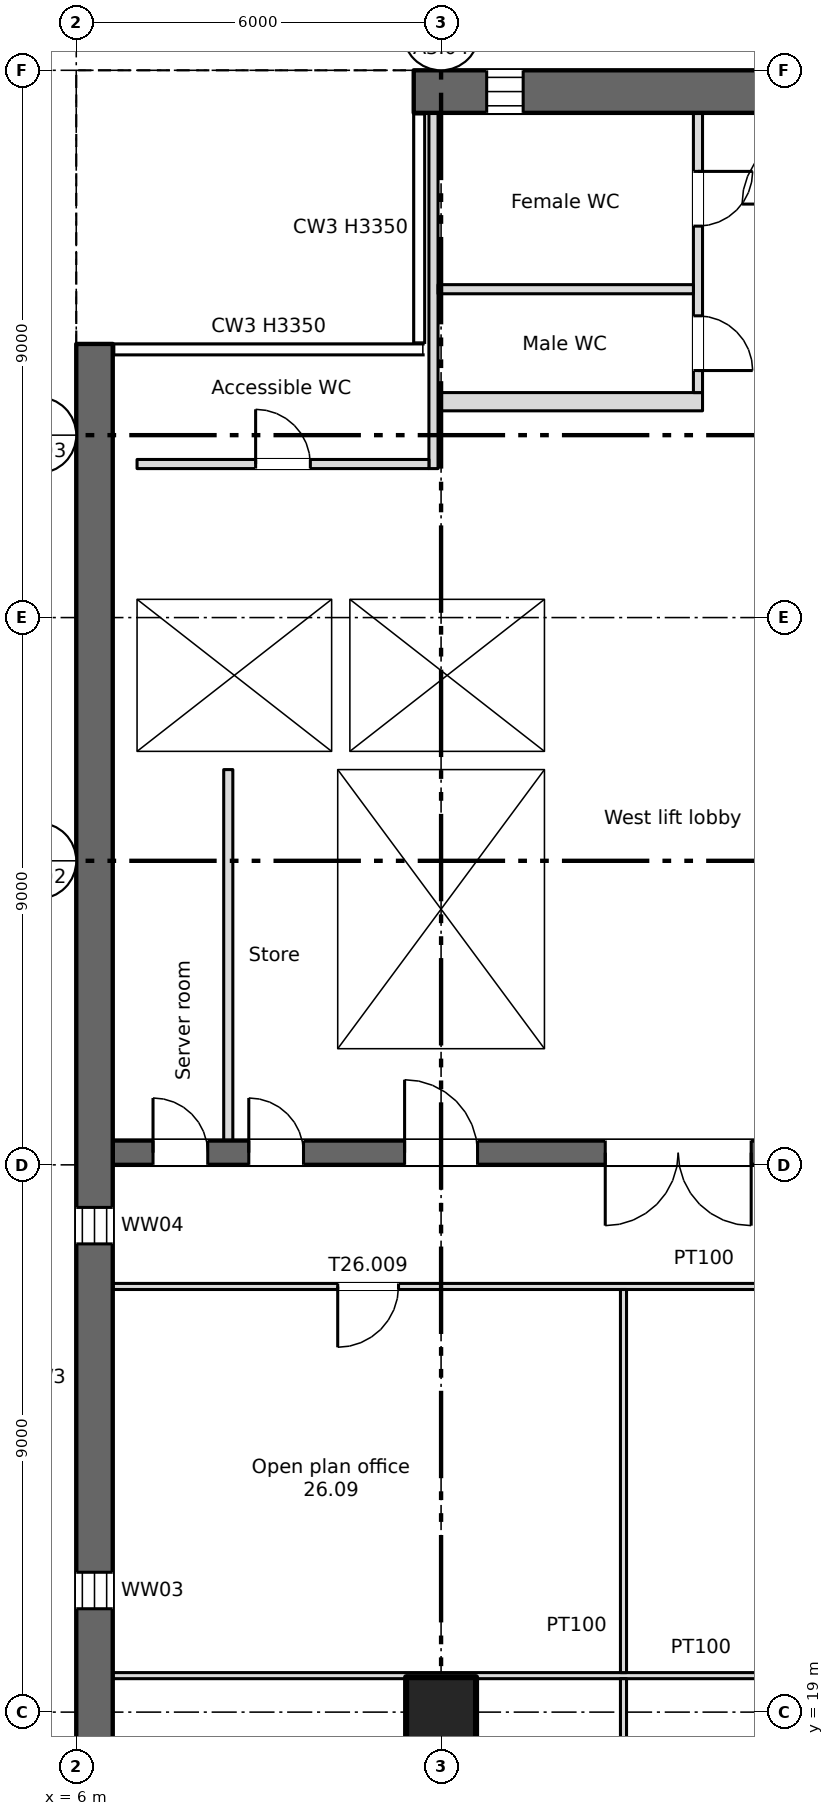
"""IFC4 building model, lengths in metres.
Left out: names, types, materials, properties, quantities, classifications, styles, units other than length and angle.
Written with IfcOpenShell. Run it as: python <this file> out.ifc"""

import sys

from ifc_helpers import new_model, si_unit, direction, frame, frame_2d, origin, origin_2d, place, context, subcontext, project, spatial, rectangle, extrude, element, fill, save


model = new_model("IFC4")
c1 = context("Model", 3, precision=1e-05, world=origin(), true_north=direction((0.0, 1.0)))
c2 = subcontext(c1, "Body", "Model", "MODEL_VIEW")
j1 = project(units=[si_unit("LENGTHUNIT", "METRE"), si_unit("PLANEANGLEUNIT", "RADIAN")], contexts=[c1])
p1 = place(None, origin())
s1 = spatial("IfcSite", under=j1, at=p1, CompositionType="ELEMENT")
p2 = place(p1, origin())
s2 = spatial("IfcBuilding", under=s1, at=p2, CompositionType="ELEMENT")
p3 = place(p2, frame((0.0, 0.0, 181.75)))
s3 = spatial("IfcBuildingStorey", under=s2, at=p3, CompositionType="ELEMENT", Elevation=181.75)
p4 = place(p3, frame((12.0, 19.0, 0.0), z_axis=(0.0, 0.0, 1.0), x_axis=(1.0, 0.0, 0.0)))
e1 = element("IfcColumn", 1, at=p4, inside=s3, PredefinedType="COLUMN", context=c2, shape_type="SweptSolid", body=[
    extrude(rectangle(XDim=1.15, YDim=1.15, at=origin_2d()), origin(), (0.0, 0.0, 1.0), 3.35),
])
p5 = place(p3, frame((6.3, 7.5, 0.0), z_axis=(0.0, 0.0, 1.0), x_axis=(0.0, 1.0, 0.0)))
e2 = element("IfcWall", 2, at=p5, inside=s3, PredefinedType="SHEAR", context=c2, shape_type="SweptSolid", body=[
    extrude(rectangle(XDim=34.0, YDim=0.6, at=frame_2d((17.0, 0.0))), origin(), (0.0, 0.0, 1.0), 3.35),
])
p6 = place(p5, frame((1.2, 0.0, 0.6)))
e3 = element("IfcOpeningElement", 3, at=p6, cuts=e2, PredefinedType="OPENING", context=c2, shape_type="SweptSolid", body=[
    extrude(rectangle(XDim=0.6, YDim=2.4, at=frame_2d((0.3, 1.2))), frame((0.0, 0.31, 0.0), z_axis=(0.0, -1.0, 0.0), x_axis=(1.0, 0.0, 0.0)), (0.0, 0.0, 1.0), 0.62),
])
p7 = place(p5, frame((7.2, 0.0, 0.6)))
e4 = element("IfcOpeningElement", 4, at=p7, cuts=e2, PredefinedType="OPENING", context=c2, shape_type="SweptSolid", body=[
    extrude(rectangle(XDim=0.6, YDim=2.4, at=frame_2d((0.3, 1.2))), frame((0.0, 0.31, 0.0), z_axis=(0.0, -1.0, 0.0), x_axis=(1.0, 0.0, 0.0)), (0.0, 0.0, 1.0), 0.62),
])
p8 = place(p5, frame((13.2, 0.0, 0.6)))
e5 = element("IfcOpeningElement", 5, at=p8, cuts=e2, PredefinedType="OPENING", context=c2, shape_type="SweptSolid", body=[
    extrude(rectangle(XDim=0.6, YDim=2.4, at=frame_2d((0.3, 1.2))), frame((0.0, 0.31, 0.0), z_axis=(0.0, -1.0, 0.0), x_axis=(1.0, 0.0, 0.0)), (0.0, 0.0, 1.0), 0.62),
])
p9 = place(p5, frame((19.2, 0.0, 0.6)))
e6 = element("IfcOpeningElement", 6, at=p9, cuts=e2, PredefinedType="OPENING", context=c2, shape_type="SweptSolid", body=[
    extrude(rectangle(XDim=0.6, YDim=2.4, at=frame_2d((0.3, 1.2))), frame((0.0, 0.31, 0.0), z_axis=(0.0, -1.0, 0.0), x_axis=(1.0, 0.0, 0.0)), (0.0, 0.0, 1.0), 0.62),
])
p10 = place(p3, frame((11.55, 45.65, 0.0), z_axis=(0.0, 0.0, 1.0), x_axis=(1.0, 0.0, 0.0)))
e7 = element("IfcWall", 7, at=p10, inside=s3, PredefinedType="SHEAR", context=c2, shape_type="SweptSolid", body=[
    extrude(rectangle(XDim=54.9, YDim=0.7, at=frame_2d((27.45, 0.0))), origin(), (0.0, 0.0, 1.0), 3.35),
])
p11 = place(p10, frame((1.2, 0.0, 0.6)))
e8 = element("IfcOpeningElement", 8, at=p11, cuts=e7, PredefinedType="OPENING", context=c2, shape_type="SweptSolid", body=[
    extrude(rectangle(XDim=0.6, YDim=2.4, at=frame_2d((0.3, 1.2))), frame((0.0, 0.36, 0.0), z_axis=(0.0, -1.0, 0.0), x_axis=(1.0, 0.0, 0.0)), (0.0, 0.0, 1.0), 0.72),
])
p12 = place(p10, frame((49.2, 0.0, 0.6)))
e9 = element("IfcOpeningElement", 9, at=p12, cuts=e7, PredefinedType="OPENING", context=c2, shape_type="SweptSolid", body=[
    extrude(rectangle(XDim=0.6, YDim=2.4, at=frame_2d((0.3, 1.2))), frame((0.0, 0.36, 0.0), z_axis=(0.0, -1.0, 0.0), x_axis=(1.0, 0.0, 0.0)), (0.0, 0.0, 1.0), 0.72),
])
p13 = place(p3, frame((6.6, 28.2, 0.0), z_axis=(0.0, 0.0, 1.0), x_axis=(1.0, 0.0, 0.0)))
e10 = element("IfcWall", 10, at=p13, inside=s3, PredefinedType="SHEAR", context=c2, shape_type="SweptSolid", body=[
    extrude(rectangle(XDim=57.9, YDim=0.4, at=frame_2d((28.95, 0.0))), origin(), (0.0, 0.0, 1.0), 3.35),
])
p14 = place(p13, frame((12.913, 0.0, 0.0)))
e11 = element("IfcOpeningElement", 11, at=p14, cuts=e10, PredefinedType="OPENING", context=c2, shape_type="SweptSolid", body=[
    extrude(rectangle(XDim=0.9, YDim=2.1, at=frame_2d((0.45, 1.05))), frame((0.0, 0.21, 0.0), z_axis=(0.0, -1.0, 0.0), x_axis=(1.0, 0.0, 0.0)), (0.0, 0.0, 1.0), 0.42),
])
p15 = place(p13, frame((15.488, 0.0, 0.0)))
e12 = element("IfcOpeningElement", 12, at=p15, cuts=e10, PredefinedType="OPENING", context=c2, shape_type="SweptSolid", body=[
    extrude(rectangle(XDim=0.9, YDim=2.1, at=frame_2d((0.45, 1.05))), frame((0.0, 0.21, 0.0), z_axis=(0.0, -1.0, 0.0), x_axis=(1.0, 0.0, 0.0)), (0.0, 0.0, 1.0), 0.42),
])
p16 = place(p13, frame((48.413, 0.0, 0.0)))
e13 = element("IfcOpeningElement", 13, at=p16, cuts=e10, PredefinedType="OPENING", context=c2, shape_type="SweptSolid", body=[
    extrude(rectangle(XDim=0.9, YDim=2.1, at=frame_2d((0.45, 1.05))), frame((0.0, 0.21, 0.0), z_axis=(0.0, -1.0, 0.0), x_axis=(1.0, 0.0, 0.0)), (0.0, 0.0, 1.0), 0.42),
])
p17 = place(p13, frame((50.988, 0.0, 0.0)))
e14 = element("IfcOpeningElement", 14, at=p17, cuts=e10, PredefinedType="OPENING", context=c2, shape_type="SweptSolid", body=[
    extrude(rectangle(XDim=0.9, YDim=2.1, at=frame_2d((0.45, 1.05))), frame((0.0, 0.21, 0.0), z_axis=(0.0, -1.0, 0.0), x_axis=(1.0, 0.0, 0.0)), (0.0, 0.0, 1.0), 0.42),
])
p18 = place(p13, frame((0.663, 0.0, 0.0)))
e15 = element("IfcOpeningElement", 15, at=p18, cuts=e10, PredefinedType="OPENING", context=c2, shape_type="SweptSolid", body=[
    extrude(rectangle(XDim=0.9, YDim=2.1, at=frame_2d((0.45, 1.05))), frame((0.0, 0.21, 0.0), z_axis=(0.0, -1.0, 0.0), x_axis=(1.0, 0.0, 0.0)), (0.0, 0.0, 1.0), 0.42),
])
p19 = place(p13, frame((2.238, 0.0, 0.0)))
e16 = element("IfcOpeningElement", 16, at=p19, cuts=e10, PredefinedType="OPENING", context=c2, shape_type="SweptSolid", body=[
    extrude(rectangle(XDim=0.9, YDim=2.1, at=frame_2d((0.45, 1.05))), frame((0.0, 0.21, 0.0), z_axis=(0.0, -1.0, 0.0), x_axis=(1.0, 0.0, 0.0)), (0.0, 0.0, 1.0), 0.42),
])
p20 = place(p13, frame((4.8, 0.0, 0.0)))
e17 = element("IfcOpeningElement", 17, at=p20, cuts=e10, PredefinedType="OPENING", context=c2, shape_type="SweptSolid", body=[
    extrude(rectangle(XDim=1.2, YDim=2.1, at=frame_2d((0.6, 1.05))), frame((0.0, 0.21, 0.0), z_axis=(0.0, -1.0, 0.0), x_axis=(1.0, 0.0, 0.0)), (0.0, 0.0, 1.0), 0.42),
])
p21 = place(p13, frame((31.8, 0.0, 0.0)))
e18 = element("IfcOpeningElement", 18, at=p21, cuts=e10, PredefinedType="OPENING", context=c2, shape_type="SweptSolid", body=[
    extrude(rectangle(XDim=1.2, YDim=2.1, at=frame_2d((0.6, 1.05))), frame((0.0, 0.21, 0.0), z_axis=(0.0, -1.0, 0.0), x_axis=(1.0, 0.0, 0.0)), (0.0, 0.0, 1.0), 0.42),
])
p22 = place(p13, frame((55.3, 0.0, 0.0)))
e19 = element("IfcOpeningElement", 19, at=p22, cuts=e10, PredefinedType="OPENING", context=c2, shape_type="SweptSolid", body=[
    extrude(rectangle(XDim=1.2, YDim=2.1, at=frame_2d((0.6, 1.05))), frame((0.0, 0.21, 0.0), z_axis=(0.0, -1.0, 0.0), x_axis=(1.0, 0.0, 0.0)), (0.0, 0.0, 1.0), 0.42),
])
p23 = place(p13, frame((21.8, 0.0, 0.0)))
e20 = element("IfcOpeningElement", 20, at=p23, cuts=e10, PredefinedType="OPENING", context=c2, shape_type="SweptSolid", body=[
    extrude(rectangle(XDim=1.2, YDim=2.1, at=frame_2d((0.6, 1.05))), frame((0.0, 0.21, 0.0), z_axis=(0.0, -1.0, 0.0), x_axis=(1.0, 0.0, 0.0)), (0.0, 0.0, 1.0), 0.42),
])
p24 = place(p13, frame((41.8, 0.0, 0.0)))
e21 = element("IfcOpeningElement", 21, at=p24, cuts=e10, PredefinedType="OPENING", context=c2, shape_type="SweptSolid", body=[
    extrude(rectangle(XDim=1.2, YDim=2.1, at=frame_2d((0.6, 1.05))), frame((0.0, 0.21, 0.0), z_axis=(0.0, -1.0, 0.0), x_axis=(1.0, 0.0, 0.0)), (0.0, 0.0, 1.0), 0.42),
])
p25 = place(p13, frame((24.95, 0.0, 0.0)))
e22 = element("IfcOpeningElement", 22, at=p25, cuts=e10, PredefinedType="OPENING", context=c2, shape_type="SweptSolid", body=[
    extrude(rectangle(XDim=2.4, YDim=2.1, at=frame_2d((1.2, 1.05))), frame((0.0, 0.21, 0.0), z_axis=(0.0, -1.0, 0.0), x_axis=(1.0, 0.0, 0.0)), (0.0, 0.0, 1.0), 0.42),
])
p26 = place(p13, frame((37.45, 0.0, 0.0)))
e23 = element("IfcOpeningElement", 23, at=p26, cuts=e10, PredefinedType="OPENING", context=c2, shape_type="SweptSolid", body=[
    extrude(rectangle(XDim=2.4, YDim=2.1, at=frame_2d((1.2, 1.05))), frame((0.0, 0.21, 0.0), z_axis=(0.0, -1.0, 0.0), x_axis=(1.0, 0.0, 0.0)), (0.0, 0.0, 1.0), 0.42),
])
p27 = place(p13, frame((8.1, 0.0, 0.0)))
e24 = element("IfcOpeningElement", 24, at=p27, cuts=e10, PredefinedType="OPENING", context=c2, shape_type="SweptSolid", body=[
    extrude(rectangle(XDim=2.4, YDim=2.1, at=frame_2d((1.2, 1.05))), frame((0.0, 0.21, 0.0), z_axis=(0.0, -1.0, 0.0), x_axis=(1.0, 0.0, 0.0)), (0.0, 0.0, 1.0), 0.42),
])
p28 = place(p13, frame((28.95, 0.0, 0.0)))
e25 = element("IfcOpeningElement", 25, at=p28, cuts=e10, PredefinedType="OPENING", context=c2, shape_type="SweptSolid", body=[
    extrude(rectangle(XDim=0.9, YDim=2.1, at=frame_2d((0.45, 1.05))), frame((0.0, 0.21, 0.0), z_axis=(0.0, -1.0, 0.0), x_axis=(1.0, 0.0, 0.0)), (0.0, 0.0, 1.0), 0.42),
])
p29 = place(p13, frame((34.95, 0.0, 0.0)))
e26 = element("IfcOpeningElement", 26, at=p29, cuts=e10, PredefinedType="OPENING", context=c2, shape_type="SweptSolid", body=[
    extrude(rectangle(XDim=0.9, YDim=2.1, at=frame_2d((0.45, 1.05))), frame((0.0, 0.21, 0.0), z_axis=(0.0, -1.0, 0.0), x_axis=(1.0, 0.0, 0.0)), (0.0, 0.0, 1.0), 0.42),
])
p30 = place(p3, frame((6.8, 28.4, 0.0), z_axis=(0.0, 0.0, 1.0), x_axis=(0.0, 1.0, 0.0)))
e27 = element("IfcWall", 27, at=p30, inside=s3, PredefinedType="SHEAR", context=c2, shape_type="SweptSolid", body=[
    extrude(rectangle(XDim=12.85, YDim=0.4, at=frame_2d((6.425, 0.0))), origin(), (0.0, 0.0, 1.0), 3.35),
])
for number, where, z_axis, x_axis in (
    (28, (10.15, 28.4, 0.0), (0.0, 0.0, 1.0), (0.0, 1.0, 0.0)),
    (29, (13.85, 28.4, 0.0), (0.0, 0.0, 1.0), (0.0, 1.0, 0.0)),
):
    element("IfcWall", number, at=place(p3, frame(where, z_axis=z_axis, x_axis=x_axis)), inside=s3, PredefinedType="SHEAR", context=c2, shape_type="SweptSolid", body=[
        extrude(rectangle(XDim=6.1, YDim=0.3, at=frame_2d((3.05, 0.0))), origin(), (0.0, 0.0, 1.0), 3.35),
    ])
for number, where, z_axis, x_axis in (
    (30, (7.0, 34.65, 0.0), (0.0, 0.0, 1.0), (1.0, 0.0, 0.0)),
    (31, (7.0, 37.45, 0.0), (0.0, 0.0, 1.0), (1.0, 0.0, 0.0)),
):
    element("IfcWall", number, at=place(p3, frame(where, z_axis=z_axis, x_axis=x_axis)), inside=s3, PredefinedType="SHEAR", context=c2, shape_type="SweptSolid", body=[
        extrude(rectangle(XDim=7.0, YDim=0.3, at=frame_2d((3.5, 0.0))), origin(), (0.0, 0.0, 1.0), 3.35),
    ])
p31 = place(p3, frame((13.85, 34.8, 0.0), z_axis=(0.0, 0.0, 1.0), x_axis=(0.0, 1.0, 0.0)))
e32 = element("IfcWall", 32, at=p31, inside=s3, PredefinedType="SHEAR", context=c2, shape_type="SweptSolid", body=[
    extrude(rectangle(XDim=2.5, YDim=0.3, at=frame_2d((1.25, 0.0))), origin(), (0.0, 0.0, 1.0), 3.35),
])
p32 = place(p3, frame((11.95, 40.55, 0.0), z_axis=(0.0, 0.0, 1.0), x_axis=(1.0, 0.0, 0.0)))
e33 = element("IfcWall", 33, at=p32, inside=s3, PredefinedType="PARTITIONING", context=c2, shape_type="SweptSolid", body=[
    extrude(rectangle(XDim=4.35, YDim=0.3, at=frame_2d((2.175, 0.0))), origin(), (0.0, 0.0, 1.0), 3.35),
])
p33 = place(p3, frame((10.35, 34.8, 0.0), z_axis=(0.0, 0.0, 1.0), x_axis=(0.0, 1.0, 0.0)))
e34 = element("IfcWall", 34, at=p33, inside=s3, PredefinedType="SHEAR", context=c2, shape_type="SweptSolid", body=[
    extrude(rectangle(XDim=2.5, YDim=0.3, at=frame_2d((1.25, 0.0))), origin(), (0.0, 0.0, 1.0), 3.35),
])
p34 = place(p3, frame((16.225, 45.3, 0.0), z_axis=(0.0, 0.0, 1.0), x_axis=(0.0, -1.0, 0.0)))
e35 = element("IfcWall", 35, at=p34, inside=s3, PredefinedType="PARTITIONING", context=c2, shape_type="SweptSolid", body=[
    extrude(rectangle(XDim=4.6, YDim=0.15, at=frame_2d((2.3, 0.0))), origin(), (0.0, 0.0, 1.0), 3.35),
])
p35 = place(p34, frame((3.337, 0.0, 0.0)))
e36 = element("IfcOpeningElement", 36, at=p35, cuts=e35, PredefinedType="OPENING", context=c2, shape_type="SweptSolid", body=[
    extrude(rectangle(XDim=0.9, YDim=2.1, at=frame_2d((0.45, 1.05))), frame((0.0, 0.085, 0.0), z_axis=(0.0, -1.0, 0.0), x_axis=(1.0, 0.0, 0.0)), (0.0, 0.0, 1.0), 0.17),
])
p36 = place(p34, frame((0.962, 0.0, 0.0)))
e37 = element("IfcOpeningElement", 37, at=p36, cuts=e35, PredefinedType="OPENING", context=c2, shape_type="SweptSolid", body=[
    extrude(rectangle(XDim=0.9, YDim=2.1, at=frame_2d((0.45, 1.05))), frame((0.0, 0.085, 0.0), z_axis=(0.0, -1.0, 0.0), x_axis=(1.0, 0.0, 0.0)), (0.0, 0.0, 1.0), 0.17),
])
p37 = place(p3, frame((8.5, 28.4, 0.0), z_axis=(0.0, 0.0, 1.0), x_axis=(0.0, 1.0, 0.0)))
e38 = element("IfcWall", 38, at=p37, inside=s3, PredefinedType="PARTITIONING", context=c2, shape_type="SweptSolid", body=[
    extrude(rectangle(XDim=6.1, YDim=0.15, at=frame_2d((3.05, 0.0))), origin(), (0.0, 0.0, 1.0), 3.35),
])
p38 = place(p3, frame((11.875, 39.45, 0.0), z_axis=(0.0, 0.0, 1.0), x_axis=(0.0, 1.0, 0.0)))
e39 = element("IfcWall", 39, at=p38, inside=s3, PredefinedType="PARTITIONING", context=c2, shape_type="SweptSolid", body=[
    extrude(rectangle(XDim=5.85, YDim=0.15, at=frame_2d((2.925, 0.0))), origin(), (0.0, 0.0, 1.0), 3.35),
])
p39 = place(p3, frame((7.0, 39.525, 0.0), z_axis=(0.0, 0.0, 1.0), x_axis=(1.0, 0.0, 0.0)))
e40 = element("IfcWall", 40, at=p39, inside=s3, PredefinedType="PARTITIONING", context=c2, shape_type="SweptSolid", body=[
    extrude(rectangle(XDim=4.8, YDim=0.15, at=frame_2d((2.4, 0.0))), origin(), (0.0, 0.0, 1.0), 3.35),
])
p40 = place(p39, frame((1.95, 0.0, 0.0)))
e41 = element("IfcOpeningElement", 41, at=p40, cuts=e40, PredefinedType="OPENING", context=c2, shape_type="SweptSolid", body=[
    extrude(rectangle(XDim=0.9, YDim=2.1, at=frame_2d((0.45, 1.05))), frame((0.0, 0.085, 0.0), z_axis=(0.0, -1.0, 0.0), x_axis=(1.0, 0.0, 0.0)), (0.0, 0.0, 1.0), 0.17),
])
p41 = place(p3, frame((11.95, 42.4, 0.0), z_axis=(0.0, 0.0, 1.0), x_axis=(1.0, 0.0, 0.0)))
e42 = element("IfcWall", 42, at=p41, inside=s3, PredefinedType="PARTITIONING", context=c2, shape_type="SweptSolid", body=[
    extrude(rectangle(XDim=4.2, YDim=0.15, at=frame_2d((2.1, 0.0))), origin(), (0.0, 0.0, 1.0), 3.35),
])
p42 = place(p3, frame((6.6, 19.6, 0.0), z_axis=(0.0, 0.0, 1.0), x_axis=(1.0, 0.0, 0.0)))
e43 = element("IfcWall", 43, at=p42, inside=s3, PredefinedType="PARTITIONING", context=c2, shape_type="SweptSolid", body=[
    extrude(rectangle(XDim=19.35, YDim=0.1, at=frame_2d((9.675, 0.0))), origin(), (0.0, 0.0, 1.0), 3.35),
])
p43 = place(p3, frame((6.6, 26.0, 0.0), z_axis=(0.0, 0.0, 1.0), x_axis=(1.0, 0.0, 0.0)))
e44 = element("IfcWall", 44, at=p43, inside=s3, PredefinedType="PARTITIONING", context=c2, shape_type="SweptSolid", body=[
    extrude(rectangle(XDim=19.45, YDim=0.1, at=frame_2d((9.725, 0.0))), origin(), (0.0, 0.0, 1.0), 3.35),
])
p44 = place(p43, frame((3.7, 0.0, 0.0)))
e45 = element("IfcOpeningElement", 45, at=p44, cuts=e44, PredefinedType="OPENING", context=c2, shape_type="SweptSolid", body=[
    extrude(rectangle(XDim=1.0, YDim=2.1, at=frame_2d((0.5, 1.05))), frame((0.0, 0.06, 0.0), z_axis=(0.0, -1.0, 0.0), x_axis=(1.0, 0.0, 0.0)), (0.0, 0.0, 1.0), 0.12),
])
p45 = place(p43, frame((13.0, 0.0, 0.0)))
e46 = element("IfcOpeningElement", 46, at=p45, cuts=e44, PredefinedType="OPENING", context=c2, shape_type="SweptSolid", body=[
    extrude(rectangle(XDim=1.8, YDim=2.1, at=frame_2d((0.9, 1.05))), frame((0.0, 0.06, 0.0), z_axis=(0.0, -1.0, 0.0), x_axis=(1.0, 0.0, 0.0)), (0.0, 0.0, 1.0), 0.12),
])
p46 = place(p3, frame((15.0, 12.65, 0.0), z_axis=(0.0, 0.0, 1.0), x_axis=(0.0, 1.0, 0.0)))
e47 = element("IfcWall", 47, at=p46, inside=s3, PredefinedType="PARTITIONING", context=c2, shape_type="SweptSolid", body=[
    extrude(rectangle(XDim=6.9, YDim=0.1, at=frame_2d((3.45, 0.0))), origin(), (0.0, 0.0, 1.0), 3.35),
])
p47 = place(p3, frame((15.0, 19.65, 0.0), z_axis=(0.0, 0.0, 1.0), x_axis=(0.0, 1.0, 0.0)))
e48 = element("IfcWall", 48, at=p47, inside=s3, PredefinedType="PARTITIONING", context=c2, shape_type="SweptSolid", body=[
    extrude(rectangle(XDim=6.3, YDim=0.1, at=frame_2d((3.15, 0.0))), origin(), (0.0, 0.0, 1.0), 3.35),
])
p48 = place(p11, origin())
e49 = element("IfcWindow", 49, at=p48, inside=s3, PartitioningType="SINGLE_PANEL", PredefinedType="WINDOW", context=c2, shape_type="SweptSolid", body=[
    extrude(rectangle(XDim=0.6, YDim=2.4, at=frame_2d((0.3, 1.2))), frame((0.0, 0.03, 0.0), z_axis=(0.0, -1.0, 0.0), x_axis=(1.0, 0.0, 0.0)), (0.0, 0.0, 1.0), 0.06),
])
fill(e8, e49)
p49 = place(p8, origin())
e50 = element("IfcWindow", 50, at=p49, inside=s3, PartitioningType="SINGLE_PANEL", PredefinedType="WINDOW", context=c2, shape_type="SweptSolid", body=[
    extrude(rectangle(XDim=0.6, YDim=2.4, at=frame_2d((0.3, 1.2))), frame((0.0, 0.03, 0.0), z_axis=(0.0, -1.0, 0.0), x_axis=(1.0, 0.0, 0.0)), (0.0, 0.0, 1.0), 0.06),
])
fill(e5, e50)
p50 = place(p9, origin())
e51 = element("IfcWindow", 51, at=p50, inside=s3, PartitioningType="SINGLE_PANEL", PredefinedType="WINDOW", context=c2, shape_type="SweptSolid", body=[
    extrude(rectangle(XDim=0.6, YDim=2.4, at=frame_2d((0.3, 1.2))), frame((0.0, 0.03, 0.0), z_axis=(0.0, -1.0, 0.0), x_axis=(1.0, 0.0, 0.0)), (0.0, 0.0, 1.0), 0.06),
])
fill(e6, e51)
p51 = place(p18, origin())
e52 = element("IfcDoor", 52, at=p51, inside=s3, OperationType="SINGLE_SWING_LEFT", PredefinedType="DOOR", context=c2, shape_type="SweptSolid", body=[
    extrude(rectangle(XDim=0.9, YDim=2.1, at=frame_2d((0.45, 1.05))), frame((0.0, 0.025, 0.0), z_axis=(0.0, -1.0, 0.0), x_axis=(1.0, 0.0, 0.0)), (0.0, 0.0, 1.0), 0.05),
])
fill(e15, e52)
p52 = place(p19, origin())
e53 = element("IfcDoor", 53, at=p52, inside=s3, OperationType="SINGLE_SWING_LEFT", PredefinedType="DOOR", context=c2, shape_type="SweptSolid", body=[
    extrude(rectangle(XDim=0.9, YDim=2.1, at=frame_2d((0.45, 1.05))), frame((0.0, 0.025, 0.0), z_axis=(0.0, -1.0, 0.0), x_axis=(1.0, 0.0, 0.0)), (0.0, 0.0, 1.0), 0.05),
])
fill(e16, e53)
p53 = place(p40, origin())
e54 = element("IfcDoor", 54, at=p53, inside=s3, OperationType="SINGLE_SWING_LEFT", PredefinedType="DOOR", context=c2, shape_type="SweptSolid", body=[
    extrude(rectangle(XDim=0.9, YDim=2.1, at=frame_2d((0.45, 1.05))), frame((0.0, 0.025, 0.0), z_axis=(0.0, -1.0, 0.0), x_axis=(1.0, 0.0, 0.0)), (0.0, 0.0, 1.0), 0.05),
])
fill(e41, e54)
p54 = place(p35, origin())
e55 = element("IfcDoor", 55, at=p54, inside=s3, OperationType="SINGLE_SWING_RIGHT", PredefinedType="DOOR", context=c2, shape_type="SweptSolid", body=[
    extrude(rectangle(XDim=0.9, YDim=2.1, at=frame_2d((0.45, 1.05))), frame((0.0, 0.025, 0.0), z_axis=(0.0, -1.0, 0.0), x_axis=(1.0, 0.0, 0.0)), (0.0, 0.0, 1.0), 0.05),
])
fill(e36, e55)
p55 = place(p36, origin())
e56 = element("IfcDoor", 56, at=p55, inside=s3, OperationType="SINGLE_SWING_LEFT", PredefinedType="DOOR", context=c2, shape_type="SweptSolid", body=[
    extrude(rectangle(XDim=0.9, YDim=2.1, at=frame_2d((0.45, 1.05))), frame((0.0, 0.025, 0.0), z_axis=(0.0, -1.0, 0.0), x_axis=(1.0, 0.0, 0.0)), (0.0, 0.0, 1.0), 0.05),
])
fill(e37, e56)
p56 = place(p20, origin())
e57 = element("IfcDoor", 57, at=p56, inside=s3, OperationType="SINGLE_SWING_LEFT", PredefinedType="DOOR", context=c2, shape_type="SweptSolid", body=[
    extrude(rectangle(XDim=1.2, YDim=2.1, at=frame_2d((0.6, 1.05))), frame((0.0, 0.025, 0.0), z_axis=(0.0, -1.0, 0.0), x_axis=(1.0, 0.0, 0.0)), (0.0, 0.0, 1.0), 0.05),
])
fill(e17, e57)
p57 = place(p27, origin())
e58 = element("IfcDoor", 58, at=p57, inside=s3, OperationType="DOUBLE_DOOR_SINGLE_SWING", PredefinedType="DOOR", context=c2, shape_type="SweptSolid", body=[
    extrude(rectangle(XDim=2.4, YDim=2.1, at=frame_2d((1.2, 1.05))), frame((0.0, 0.025, 0.0), z_axis=(0.0, -1.0, 0.0), x_axis=(1.0, 0.0, 0.0)), (0.0, 0.0, 1.0), 0.05),
])
fill(e24, e58)
p58 = place(p44, origin())
e59 = element("IfcDoor", 59, at=p58, inside=s3, OperationType="SINGLE_SWING_LEFT", PredefinedType="DOOR", context=c2, shape_type="SweptSolid", body=[
    extrude(rectangle(XDim=1.0, YDim=2.1, at=frame_2d((0.5, 1.05))), frame((0.0, 0.025, 0.0), z_axis=(0.0, -1.0, 0.0), x_axis=(1.0, 0.0, 0.0)), (0.0, 0.0, 1.0), 0.05),
])
fill(e45, e59)
save(model, sys.argv[1])
